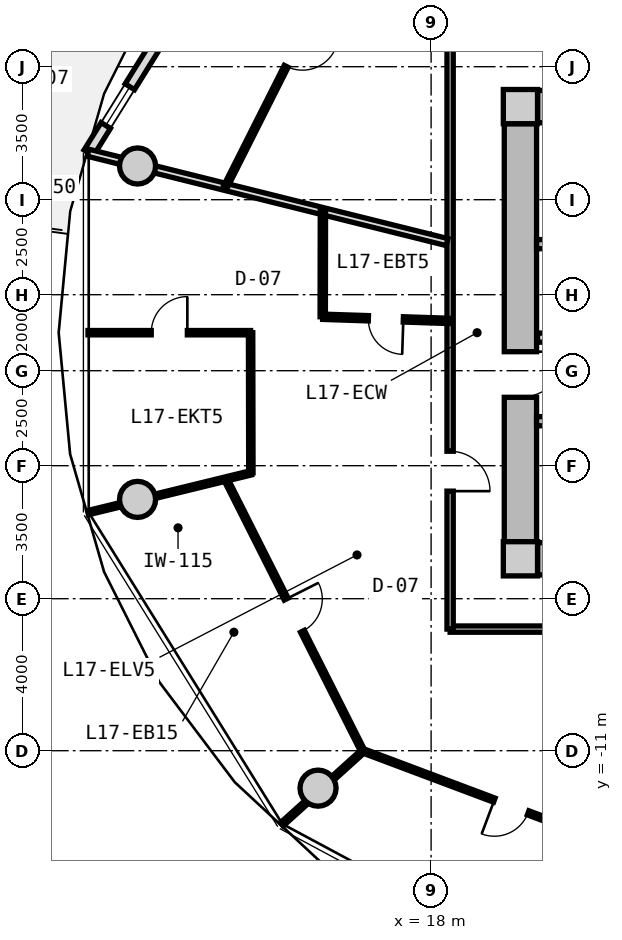
"""IFC4 building model, lengths in metres.
Left out: names, types, materials, properties, quantities, classifications, styles, units other than length and angle.
Written with IfcOpenShell. Run it as: python <this file> out.ifc"""

import sys

from ifc_helpers import new_model, si_unit, direction, frame, frame_2d, origin, origin_2d, place, context, subcontext, project, spatial, rectangle, circle, extrude, source, transform, mapped, element, fill, save


model = new_model("IFC4")
c1 = context("Model", 3, precision=1e-05, world=origin(), true_north=direction((0.0, 1.0)))
c2 = subcontext(c1, "Body", "Model", "MODEL_VIEW")
j1 = project(units=[si_unit("LENGTHUNIT", "METRE"), si_unit("PLANEANGLEUNIT", "RADIAN")], contexts=[c1])
p1 = place(None, origin())
s1 = spatial("IfcSite", under=j1, at=p1, CompositionType="ELEMENT")
p2 = place(p1, origin())
s2 = spatial("IfcBuilding", under=s1, at=p2, CompositionType="ELEMENT")
p3 = place(p2, frame((0.0, 0.0, 58.2)))
s3 = spatial("IfcBuildingStorey", under=s2, at=p3, CompositionType="ELEMENT", Elevation=58.2)
m1 = source(origin(), c2, "Body", "SweptSolid", [
    extrude(rectangle(XDim=0.9, YDim=0.9, at=origin_2d()), origin(), (0.0, 0.0, 1.0), 3.05),
])
for number, where, z_axis, x_axis in (
    (1, (20.35, -5.95, 0.0), (0.0, 0.0, 1.0), (1.0, 0.0, 0.0)),
    (2, (20.35, 5.95, 0.0), (0.0, 0.0, 1.0), (1.0, 0.0, 0.0)),
):
    element("IfcColumn", number, at=place(p3, frame(where, z_axis=z_axis, x_axis=x_axis)), inside=s3, PredefinedType="COLUMN", context=c2, shape_type="MappedRepresentation", body=[
        mapped(m1, transform((0.0, 0.0, 0.0), x_axis=(1.0, 0.0, 0.0), y_axis=(0.0, 1.0, 0.0), z_axis=(0.0, 0.0, 1.0), scale=1.0)),
    ])
m2 = source(origin(), c2, "Body", "SweptSolid", [
    extrude(rectangle(XDim=14.4, YDim=0.85, at=frame_2d((7.2, 0.0))), origin(), (0.0, 0.0, 1.0), 2.79),
])
for number, where, z_axis, x_axis in (
    (3, (20.8, 5.95, 0.0), (0.0, 0.0, 1.0), (1.0, 0.0, 0.0)),
    (4, (35.2, -5.95, 0.0), (0.0, 0.0, 1.0), (-1.0, 0.0, 0.0)),
):
    element("IfcWall", number, at=place(p3, frame(where, z_axis=z_axis, x_axis=x_axis)), inside=s3, PredefinedType="SHEAR", context=c2, shape_type="MappedRepresentation", body=[
        mapped(m2, transform((0.0, 0.0, 0.0), x_axis=(1.0, 0.0, 0.0), y_axis=(0.0, 1.0, 0.0), z_axis=(0.0, 0.0, 1.0), scale=1.0)),
    ])
m3 = source(origin(), c2, "Body", "SweptSolid", [
    extrude(rectangle(XDim=11.0, YDim=0.85, at=frame_2d((5.5, 0.0))), origin(), (0.0, 0.0, 1.0), 2.79),
])
p4 = place(p3, frame((20.35, -5.5, 0.0), z_axis=(0.0, 0.0, 1.0), x_axis=(0.0, 1.0, 0.0)))
e5 = element("IfcWall", 5, at=p4, inside=s3, PredefinedType="SHEAR", context=c2, shape_type="MappedRepresentation", body=[
    mapped(m3, transform((0.0, 0.0, 0.0), x_axis=(1.0, 0.0, 0.0), y_axis=(0.0, 1.0, 0.0), z_axis=(0.0, 0.0, 1.0), scale=1.0)),
])
p5 = place(p4, frame((3.8, 0.0, 0.0)))
e6 = element("IfcOpeningElement", 6, at=p5, cuts=e5, PredefinedType="OPENING", context=c2, shape_type="SweptSolid", body=[
    extrude(rectangle(XDim=1.2, YDim=2.15, at=frame_2d((0.6, 1.075))), frame((0.0, 0.435, 0.0), z_axis=(0.0, -1.0, 0.0), x_axis=(1.0, 0.0, 0.0)), (0.0, 0.0, 1.0), 0.87),
])
m4 = source(origin(), c2, "Body", "SweptSolid", [
    extrude(circle(Radius=0.475, at=origin_2d()), origin(), (0.0, 0.0, 1.0), 3.05),
])
for number, where, z_axis, x_axis in (
    (7, (10.275, 4.387, 0.0), (0.0, 0.0, 1.0), (1.0, 0.0, 0.0)),
    (8, (10.275, -4.387, 0.0), (0.0, 0.0, 1.0), (1.0, 0.0, 0.0)),
    (9, (15.025, -11.985, 0.0), (0.0, 0.0, 1.0), (1.0, 0.0, 0.0)),
):
    element("IfcColumn", number, at=place(p3, frame(where, z_axis=z_axis, x_axis=x_axis)), inside=s3, PredefinedType="COLUMN", context=c2, shape_type="MappedRepresentation", body=[
        mapped(m4, transform((0.0, 0.0, 0.0), x_axis=(1.0, 0.0, 0.0), y_axis=(0.0, 1.0, 0.0), z_axis=(0.0, 0.0, 1.0), scale=1.0)),
    ])
m5 = source(origin(), c2, "Body", "SweptSolid", [
    extrude(rectangle(XDim=9.649, YDim=0.29, at=frame_2d((4.824, 0.0))), origin(), (0.0, 0.0, 1.0), 2.79),
])
p6 = place(p3, frame((8.99, 4.731, 0.0), z_axis=(0.0, 0.0, 1.0), x_axis=(0.527909458386, 0.849300655684, 0.0)))
e10 = element("IfcWall", 10, at=p6, inside=s3, PredefinedType="SOLIDWALL", context=c2, shape_type="MappedRepresentation", body=[
    mapped(m5, transform((0.0, 0.0, 0.0), x_axis=(1.0, 0.0, 0.0), y_axis=(0.0, 1.0, 0.0), z_axis=(0.0, 0.0, 1.0), scale=1.0)),
])
p7 = place(p6, frame((7.54, 0.0, 0.0)))
e11 = element("IfcOpeningElement", 11, at=p7, cuts=e10, PredefinedType="OPENING", context=c2, shape_type="SweptSolid", body=[
    extrude(rectangle(XDim=1.15, YDim=2.25, at=frame_2d((0.575, 1.125))), frame((0.0, 0.155, 0.0), z_axis=(0.0, -1.0, 0.0), x_axis=(1.0, 0.0, 0.0)), (0.0, 0.0, 1.0), 0.31),
])
p8 = place(p6, frame((0.85, 0.0, 0.85)))
e12 = element("IfcOpeningElement", 12, at=p8, cuts=e10, PredefinedType="OPENING", context=c2, shape_type="SweptSolid", body=[
    extrude(rectangle(XDim=1.2, YDim=1.5, at=frame_2d((0.6, 0.75))), frame((0.0, 0.155, 0.0), z_axis=(0.0, -1.0, 0.0), x_axis=(1.0, 0.0, 0.0)), (0.0, 0.0, 1.0), 0.31),
])
m6 = source(origin(), c2, "Body", "SweptSolid", [
    extrude(rectangle(XDim=7.765, YDim=0.24, at=frame_2d((3.883, 0.0))), origin(), (0.0, 0.0, 1.0), 2.79),
])
p9 = place(p3, frame((20.775, 2.33, 0.0), z_axis=(0.0, 0.0, 1.0), x_axis=(1.0, 0.0, 0.0)))
e13 = element("IfcWall", 13, at=p9, inside=s3, PredefinedType="PARTITIONING", context=c2, shape_type="MappedRepresentation", body=[
    mapped(m6, transform((0.0, 0.0, 0.0), x_axis=(1.0, 0.0, 0.0), y_axis=(0.0, 1.0, 0.0), z_axis=(0.0, 0.0, 1.0), scale=1.0)),
])
p10 = place(p3, frame((20.775, -2.33, 0.0), z_axis=(0.0, 0.0, 1.0), x_axis=(1.0, 0.0, 0.0)))
e14 = element("IfcWall", 14, at=p10, inside=s3, PredefinedType="PARTITIONING", context=c2, shape_type="MappedRepresentation", body=[
    mapped(m6, transform((0.0, 0.0, 0.0), x_axis=(1.0, 0.0, 0.0), y_axis=(0.0, 1.0, 0.0), z_axis=(0.0, 0.0, 1.0), scale=1.0)),
])
p11 = place(p10, frame((0.885, 0.0, 0.0)))
e15 = element("IfcOpeningElement", 15, at=p11, cuts=e14, PredefinedType="OPENING", context=c2, shape_type="SweptSolid", body=[
    extrude(rectangle(XDim=1.1, YDim=2.15, at=frame_2d((0.55, 1.075))), frame((0.0, 0.13, 0.0), z_axis=(0.0, -1.0, 0.0), x_axis=(1.0, 0.0, 0.0)), (0.0, 0.0, 1.0), 0.26),
])
m7 = source(origin(), c2, "Body", "SweptSolid", [
    extrude(rectangle(XDim=7.62, YDim=0.24, at=frame_2d((3.81, 0.0))), origin(), (0.0, 0.0, 1.0), 2.775),
])
p12 = place(p3, frame((20.8, -0.13, 0.0), z_axis=(0.0, 0.0, 1.0), x_axis=(1.0, 0.0, 0.0)))
e16 = element("IfcWall", 16, at=p12, inside=s3, PredefinedType="PARTITIONING", context=c2, shape_type="MappedRepresentation", body=[
    mapped(m7, transform((0.0, 0.0, 0.0), x_axis=(1.0, 0.0, 0.0), y_axis=(0.0, 1.0, 0.0), z_axis=(0.0, 0.0, 1.0), scale=1.0)),
])
p13 = place(p12, frame((6.22, 0.0, 0.0)))
e17 = element("IfcOpeningElement", 17, at=p13, cuts=e16, PredefinedType="OPENING", context=c2, shape_type="SweptSolid", body=[
    extrude(rectangle(XDim=1.0, YDim=2.1, at=frame_2d((0.5, 1.05))), frame((0.0, 0.13, 0.0), z_axis=(0.0, -1.0, 0.0), x_axis=(1.0, 0.0, 0.0)), (0.0, 0.0, 1.0), 0.26),
])
p14 = place(p12, frame((0.85, 0.0, 0.0)))
e18 = element("IfcOpeningElement", 18, at=p14, cuts=e16, PredefinedType="OPENING", context=c2, shape_type="SweptSolid", body=[
    extrude(rectangle(XDim=1.1, YDim=2.2, at=frame_2d((0.55, 1.1))), frame((0.0, 0.13, 0.0), z_axis=(0.0, -1.0, 0.0), x_axis=(1.0, 0.0, 0.0)), (0.0, 0.0, 1.0), 0.26),
])
p15 = place(p12, frame((3.85, 0.0, 0.0)))
e19 = element("IfcOpeningElement", 19, at=p15, cuts=e16, PredefinedType="OPENING", context=c2, shape_type="SweptSolid", body=[
    extrude(rectangle(XDim=1.1, YDim=2.2, at=frame_2d((0.55, 1.1))), frame((0.0, 0.13, 0.0), z_axis=(0.0, -1.0, 0.0), x_axis=(1.0, 0.0, 0.0)), (0.0, 0.0, 1.0), 0.26),
])
m8 = source(origin(), c2, "Body", "SweptSolid", [
    extrude(rectangle(XDim=19.0, YDim=0.165, at=frame_2d((9.5, 0.0))), origin(), (0.0, 0.0, 1.0), 2.775),
])
p16 = place(p3, frame((37.5, -7.8, 0.0), z_axis=(0.0, 0.0, 1.0), x_axis=(-1.0, 0.0, 0.0)))
e20 = element("IfcWall", 20, at=p16, inside=s3, PredefinedType="PARTITIONING", context=c2, shape_type="MappedRepresentation", body=[
    mapped(m8, transform((0.0, 0.0, 0.0), x_axis=(1.0, 0.0, 0.0), y_axis=(0.0, 1.0, 0.0), z_axis=(0.0, 0.0, 1.0), scale=1.0)),
])
p17 = place(p16, frame((10.523, 0.0, 0.0)))
e21 = element("IfcOpeningElement", 21, at=p17, cuts=e20, PredefinedType="OPENING", context=c2, shape_type="SweptSolid", body=[
    extrude(rectangle(XDim=0.92, YDim=2.1, at=frame_2d((0.46, 1.05))), frame((0.0, 0.093, 0.0), z_axis=(0.0, -1.0, 0.0), x_axis=(1.0, 0.0, 0.0)), (0.0, 0.0, 1.0), 0.185),
])
p18 = place(p16, frame((8.226, 0.0, 0.0)))
e22 = element("IfcOpeningElement", 22, at=p18, cuts=e20, PredefinedType="OPENING", context=c2, shape_type="SweptSolid", body=[
    extrude(rectangle(XDim=0.92, YDim=2.1, at=frame_2d((0.46, 1.05))), frame((0.0, 0.093, 0.0), z_axis=(0.0, -1.0, 0.0), x_axis=(1.0, 0.0, 0.0)), (0.0, 0.0, 1.0), 0.185),
])
m9 = source(origin(), c2, "Body", "SweptSolid", [
    extrude(rectangle(XDim=15.6, YDim=0.165, at=frame_2d((7.8, 0.0))), origin(), (0.0, 0.0, 1.0), 2.775),
])
p19 = place(p3, frame((18.5, -7.8, 0.0), z_axis=(0.0, 0.0, 1.0), x_axis=(0.0, 1.0, 0.0)))
e23 = element("IfcWall", 23, at=p19, inside=s3, PredefinedType="PARTITIONING", context=c2, shape_type="MappedRepresentation", body=[
    mapped(m9, transform((0.0, 0.0, 0.0), x_axis=(1.0, 0.0, 0.0), y_axis=(0.0, 1.0, 0.0), z_axis=(0.0, 0.0, 1.0), scale=1.0)),
])
p20 = place(p19, frame((3.63, 0.0, 0.0)))
e24 = element("IfcOpeningElement", 24, at=p20, cuts=e23, PredefinedType="OPENING", context=c2, shape_type="SweptSolid", body=[
    extrude(rectangle(XDim=1.05, YDim=2.15, at=frame_2d((0.525, 1.075))), frame((0.0, 0.093, 0.0), z_axis=(0.0, -1.0, 0.0), x_axis=(1.0, 0.0, 0.0)), (0.0, 0.0, 1.0), 0.185),
])
m10 = source(origin(), c2, "Body", "SweptSolid", [
    extrude(rectangle(XDim=9.737, YDim=0.19, at=frame_2d((4.869, 0.0))), origin(), (0.0, 0.0, 1.0), 2.225),
])
p21 = place(p3, frame((18.42, 2.385, 0.0), z_axis=(0.0, 0.0, 1.0), x_axis=(-0.970392716238, 0.241532557375, 0.0)))
e25 = element("IfcWall", 25, at=p21, inside=s3, PredefinedType="PARTITIONING", context=c2, shape_type="MappedRepresentation", body=[
    mapped(m10, transform((0.0, 0.0, 0.0), x_axis=(1.0, 0.0, 0.0), y_axis=(0.0, 1.0, 0.0), z_axis=(0.0, 0.0, 1.0), scale=1.0)),
])
m11 = source(origin(), c2, "Body", "SweptSolid", [
    extrude(rectangle(XDim=8.018, YDim=0.115, at=frame_2d((4.009, 0.0))), origin(), (0.0, 0.0, 1.0), 2.775),
])
p22 = place(p3, frame((12.596, -3.854, 0.0), z_axis=(0.0, 0.0, 1.0), x_axis=(0.450134355233, -0.89296084026, 0.0)))
e26 = element("IfcWall", 26, at=p22, inside=s3, PredefinedType="PARTITIONING", context=c2, shape_type="MappedRepresentation", body=[
    mapped(m11, transform((0.0, 0.0, 0.0), x_axis=(1.0, 0.0, 0.0), y_axis=(0.0, 1.0, 0.0), z_axis=(0.0, 0.0, 1.0), scale=1.0)),
])
p23 = place(p22, frame((3.534, 0.0, 0.0)))
e27 = element("IfcOpeningElement", 27, at=p23, cuts=e26, PredefinedType="OPENING", context=c2, shape_type="SweptSolid", body=[
    extrude(rectangle(XDim=0.95, YDim=2.1, at=frame_2d((0.475, 1.05))), frame((0.0, 0.067, 0.0), z_axis=(0.0, -1.0, 0.0), x_axis=(1.0, 0.0, 0.0)), (0.0, 0.0, 1.0), 0.135),
])
m12 = source(origin(), c2, "Body", "SweptSolid", [
    extrude(rectangle(XDim=4.414, YDim=0.115, at=frame_2d((2.207, 0.0))), origin(), (0.0, 0.0, 1.0), 2.225),
])
p24 = place(p3, frame((13.259, -3.688, 0.0), z_axis=(0.0, 0.0, 1.0), x_axis=(-0.971401274504, -0.237443812073, 0.0)))
e28 = element("IfcWall", 28, at=p24, inside=s3, PredefinedType="PARTITIONING", context=c2, shape_type="MappedRepresentation", body=[
    mapped(m12, transform((0.0, 0.0, 0.0), x_axis=(1.0, 0.0, 0.0), y_axis=(0.0, 1.0, 0.0), z_axis=(0.0, 0.0, 1.0), scale=1.0)),
])
m13 = source(origin(), c2, "Body", "SweptSolid", [
    extrude(rectangle(XDim=8.32, YDim=0.115, at=frame_2d((4.16, 0.0))), origin(), (0.0, 0.0, 1.0), 2.775),
])
p25 = place(p3, frame((16.214, -11.006, 0.0), z_axis=(0.0, 0.0, 1.0), x_axis=(0.936180763098, -0.351518959382, 0.0)))
e29 = element("IfcWall", 29, at=p25, inside=s3, PredefinedType="PARTITIONING", context=c2, shape_type="MappedRepresentation", body=[
    mapped(m13, transform((0.0, 0.0, 0.0), x_axis=(1.0, 0.0, 0.0), y_axis=(0.0, 1.0, 0.0), z_axis=(0.0, 0.0, 1.0), scale=1.0)),
])
p26 = place(p25, frame((3.685, 0.0, 0.0)))
e30 = element("IfcOpeningElement", 30, at=p26, cuts=e29, PredefinedType="OPENING", context=c2, shape_type="SweptSolid", body=[
    extrude(rectangle(XDim=0.95, YDim=2.1, at=frame_2d((0.475, 1.05))), frame((0.0, 0.067, 0.0), z_axis=(0.0, -1.0, 0.0), x_axis=(1.0, 0.0, 0.0)), (0.0, 0.0, 1.0), 0.135),
])
m14 = source(origin(), c2, "Body", "SweptSolid", [
    extrude(rectangle(XDim=2.887, YDim=0.115, at=frame_2d((1.444, 0.0))), origin(), (0.0, 0.0, 1.0), 2.225),
])
p27 = place(p3, frame((16.214, -11.006, 0.0), z_axis=(0.0, 0.0, 1.0), x_axis=(-0.742448503307, -0.669903142205, 0.0)))
e31 = element("IfcWall", 31, at=p27, inside=s3, PredefinedType="PARTITIONING", context=c2, shape_type="MappedRepresentation", body=[
    mapped(m14, transform((0.0, 0.0, 0.0), x_axis=(1.0, 0.0, 0.0), y_axis=(0.0, 1.0, 0.0), z_axis=(0.0, 0.0, 1.0), scale=1.0)),
])
m15 = source(origin(), c2, "Body", "SweptSolid", [
    extrude(rectangle(XDim=3.323, YDim=0.14, at=frame_2d((1.662, 0.0))), origin(), (0.0, 0.0, 1.0), 2.775),
])
p28 = place(p3, frame((18.47, 0.311, 0.0), z_axis=(0.0, 0.0, 1.0), x_axis=(-0.999467979553, 0.032615300817, 0.0)))
e32 = element("IfcWall", 32, at=p28, inside=s3, PredefinedType="PARTITIONING", context=c2, shape_type="MappedRepresentation", body=[
    mapped(m15, transform((0.0, 0.0, 0.0), x_axis=(1.0, 0.0, 0.0), y_axis=(0.0, 1.0, 0.0), z_axis=(0.0, 0.0, 1.0), scale=1.0)),
])
p29 = place(p28, frame((1.202, 0.0, 0.0)))
e33 = element("IfcOpeningElement", 33, at=p29, cuts=e32, PredefinedType="OPENING", context=c2, shape_type="SweptSolid", body=[
    extrude(rectangle(XDim=0.92, YDim=2.1, at=frame_2d((0.46, 1.05))), frame((0.0, 0.08, 0.0), z_axis=(0.0, -1.0, 0.0), x_axis=(1.0, 0.0, 0.0)), (0.0, 0.0, 1.0), 0.16),
])
m16 = source(origin(), c2, "Body", "SweptSolid", [
    extrude(rectangle(XDim=2.795, YDim=0.14, at=frame_2d((1.397, 0.0))), origin(), (0.0, 0.0, 1.0), 2.775),
])
p30 = place(p3, frame((15.148, 0.419, 0.0), z_axis=(0.0, 0.0, 1.0), x_axis=(0.001659531299, 0.999998622977, 0.0)))
e34 = element("IfcWall", 34, at=p30, inside=s3, PredefinedType="PARTITIONING", context=c2, shape_type="MappedRepresentation", body=[
    mapped(m16, transform((0.0, 0.0, 0.0), x_axis=(1.0, 0.0, 0.0), y_axis=(0.0, 1.0, 0.0), z_axis=(0.0, 0.0, 1.0), scale=1.0)),
])
m17 = source(origin(), c2, "Body", "SweptSolid", [
    extrude(rectangle(XDim=4.279, YDim=0.115, at=frame_2d((2.139, 0.0))), origin(), (0.0, 0.0, 1.0), 2.775),
])
p31 = place(p3, frame((13.25, 0.0, 0.0), z_axis=(0.0, 0.0, 1.0), x_axis=(-1.0, 0.0, 0.0)))
e35 = element("IfcWall", 35, at=p31, inside=s3, PredefinedType="PARTITIONING", context=c2, shape_type="MappedRepresentation", body=[
    mapped(m17, transform((0.0, 0.0, 0.0), x_axis=(1.0, 0.0, 0.0), y_axis=(0.0, 1.0, 0.0), z_axis=(0.0, 0.0, 1.0), scale=1.0)),
])
p32 = place(p31, frame((1.664, 0.0, 0.0)))
e36 = element("IfcOpeningElement", 36, at=p32, cuts=e35, PredefinedType="OPENING", context=c2, shape_type="SweptSolid", body=[
    extrude(rectangle(XDim=0.95, YDim=2.1, at=frame_2d((0.475, 1.05))), frame((0.0, 0.067, 0.0), z_axis=(0.0, -1.0, 0.0), x_axis=(1.0, 0.0, 0.0)), (0.0, 0.0, 1.0), 0.135),
])
m18 = source(origin(), c2, "Body", "SweptSolid", [
    extrude(rectangle(XDim=3.689, YDim=0.115, at=frame_2d((1.844, 0.0))), origin(), (0.0, 0.0, 1.0), 2.775),
])
p33 = place(p3, frame((13.25, 0.0, 0.0), z_axis=(0.0, 0.0, 1.0), x_axis=(0.001919382261, -0.999998157984, 0.0)))
e37 = element("IfcWall", 37, at=p33, inside=s3, PredefinedType="PARTITIONING", context=c2, shape_type="MappedRepresentation", body=[
    mapped(m18, transform((0.0, 0.0, 0.0), x_axis=(1.0, 0.0, 0.0), y_axis=(0.0, 1.0, 0.0), z_axis=(0.0, 0.0, 1.0), scale=1.0)),
])
p34 = place(p3, frame((16.205, 11.014, 0.0), z_axis=(0.0, 0.0, 1.0), x_axis=(-0.450134355233, -0.89296084026, 0.0)))
e38 = element("IfcWall", 38, at=p34, inside=s3, PredefinedType="PARTITIONING", context=c2, shape_type="MappedRepresentation", body=[
    mapped(m11, transform((0.0, 0.0, 0.0), x_axis=(1.0, 0.0, 0.0), y_axis=(0.0, 1.0, 0.0), z_axis=(0.0, 0.0, 1.0), scale=1.0)),
])
p35 = place(p34, frame((3.534, 0.0, 0.0)))
e39 = element("IfcOpeningElement", 39, at=p35, cuts=e38, PredefinedType="OPENING", context=c2, shape_type="SweptSolid", body=[
    extrude(rectangle(XDim=0.95, YDim=2.1, at=frame_2d((0.475, 1.05))), frame((0.0, 0.067, 0.0), z_axis=(0.0, -1.0, 0.0), x_axis=(1.0, 0.0, 0.0)), (0.0, 0.0, 1.0), 0.135),
])
m19 = source(origin(), c2, "Body", "SweptSolid", [
    extrude(rectangle(XDim=1.2, YDim=1.5, at=frame_2d((0.6, 0.75))), frame((0.0, 0.03, 0.0), z_axis=(0.0, -1.0, 0.0), x_axis=(1.0, 0.0, 0.0)), (0.0, 0.0, 1.0), 0.06),
])
p36 = place(p8, origin())
e40 = element("IfcWindow", 40, at=p36, inside=s3, PartitioningType="SINGLE_PANEL", PredefinedType="WINDOW", context=c2, shape_type="MappedRepresentation", body=[
    mapped(m19, transform((0.0, 0.0, 0.0), x_axis=(1.0, 0.0, 0.0), y_axis=(0.0, 1.0, 0.0), z_axis=(0.0, 0.0, 1.0), scale=1.0)),
])
fill(e12, e40)
m20 = source(origin(), c2, "Body", "SweptSolid", [
    extrude(rectangle(XDim=1.2, YDim=2.15, at=frame_2d((0.6, 1.075))), frame((0.0, 0.025, 0.0), z_axis=(0.0, -1.0, 0.0), x_axis=(1.0, 0.0, 0.0)), (0.0, 0.0, 1.0), 0.05),
])
p37 = place(p5, frame((1.2, 0.0, 0.0), z_axis=(0.0, 0.0, 1.0), x_axis=(-1.0, 0.0, 0.0)))
e41 = element("IfcDoor", 41, at=p37, inside=s3, OperationType="SINGLE_SWING_LEFT", PredefinedType="DOOR", context=c2, shape_type="MappedRepresentation", body=[
    mapped(m20, transform((0.0, 0.0, 0.0), x_axis=(1.0, 0.0, 0.0), y_axis=(0.0, 1.0, 0.0), z_axis=(0.0, 0.0, 1.0), scale=1.0)),
])
fill(e6, e41)
m21 = source(origin(), c2, "Body", "SweptSolid", [
    extrude(rectangle(XDim=1.05, YDim=2.15, at=frame_2d((0.525, 1.075))), frame((0.0, 0.025, 0.0), z_axis=(0.0, -1.0, 0.0), x_axis=(1.0, 0.0, 0.0)), (0.0, 0.0, 1.0), 0.05),
])
p38 = place(p20, frame((1.05, 0.0, 0.0), z_axis=(0.0, 0.0, 1.0), x_axis=(-1.0, 0.0, 0.0)))
e42 = element("IfcDoor", 42, at=p38, inside=s3, OperationType="SINGLE_SWING_RIGHT", PredefinedType="DOOR", context=c2, shape_type="MappedRepresentation", body=[
    mapped(m21, transform((0.0, 0.0, 0.0), x_axis=(1.0, 0.0, 0.0), y_axis=(0.0, 1.0, 0.0), z_axis=(0.0, 0.0, 1.0), scale=1.0)),
])
fill(e24, e42)
m22 = source(origin(), c2, "Body", "SweptSolid", [
    extrude(rectangle(XDim=0.92, YDim=2.1, at=frame_2d((0.46, 1.05))), frame((0.0, 0.025, 0.0), z_axis=(0.0, -1.0, 0.0), x_axis=(1.0, 0.0, 0.0)), (0.0, 0.0, 1.0), 0.05),
])
p39 = place(p29, origin())
e43 = element("IfcDoor", 43, at=p39, inside=s3, OperationType="SINGLE_SWING_LEFT", PredefinedType="DOOR", context=c2, shape_type="MappedRepresentation", body=[
    mapped(m22, transform((0.0, 0.0, 0.0), x_axis=(1.0, 0.0, 0.0), y_axis=(0.0, 1.0, 0.0), z_axis=(0.0, 0.0, 1.0), scale=1.0)),
])
fill(e33, e43)
m23 = source(origin(), c2, "Body", "SweptSolid", [
    extrude(rectangle(XDim=0.95, YDim=2.1, at=frame_2d((0.475, 1.05))), frame((0.0, 0.025, 0.0), z_axis=(0.0, -1.0, 0.0), x_axis=(1.0, 0.0, 0.0)), (0.0, 0.0, 1.0), 0.05),
])
p40 = place(p32, frame((0.95, 0.0, 0.0), z_axis=(0.0, 0.0, 1.0), x_axis=(-1.0, 0.0, 0.0)))
e44 = element("IfcDoor", 44, at=p40, inside=s3, OperationType="SINGLE_SWING_RIGHT", PredefinedType="DOOR", context=c2, shape_type="MappedRepresentation", body=[
    mapped(m23, transform((0.0, 0.0, 0.0), x_axis=(1.0, 0.0, 0.0), y_axis=(0.0, 1.0, 0.0), z_axis=(0.0, 0.0, 1.0), scale=1.0)),
])
fill(e36, e44)
p41 = place(p23, origin())
e45 = element("IfcDoor", 45, at=p41, inside=s3, OperationType="SINGLE_SWING_LEFT", PredefinedType="DOOR", context=c2, shape_type="MappedRepresentation", body=[
    mapped(m23, transform((0.0, 0.0, 0.0), x_axis=(1.0, 0.0, 0.0), y_axis=(0.0, 1.0, 0.0), z_axis=(0.0, 0.0, 1.0), scale=1.0)),
])
fill(e27, e45)
p42 = place(p26, frame((0.95, 0.0, 0.0), z_axis=(0.0, 0.0, 1.0), x_axis=(-1.0, 0.0, 0.0)))
e46 = element("IfcDoor", 46, at=p42, inside=s3, OperationType="SINGLE_SWING_RIGHT", PredefinedType="DOOR", context=c2, shape_type="MappedRepresentation", body=[
    mapped(m23, transform((0.0, 0.0, 0.0), x_axis=(1.0, 0.0, 0.0), y_axis=(0.0, 1.0, 0.0), z_axis=(0.0, 0.0, 1.0), scale=1.0)),
])
fill(e30, e46)
p43 = place(p35, origin())
e47 = element("IfcDoor", 47, at=p43, inside=s3, OperationType="SINGLE_SWING_LEFT", PredefinedType="DOOR", context=c2, shape_type="MappedRepresentation", body=[
    mapped(m23, transform((0.0, 0.0, 0.0), x_axis=(1.0, 0.0, 0.0), y_axis=(0.0, 1.0, 0.0), z_axis=(0.0, 0.0, 1.0), scale=1.0)),
])
fill(e39, e47)
save(model, sys.argv[1])
